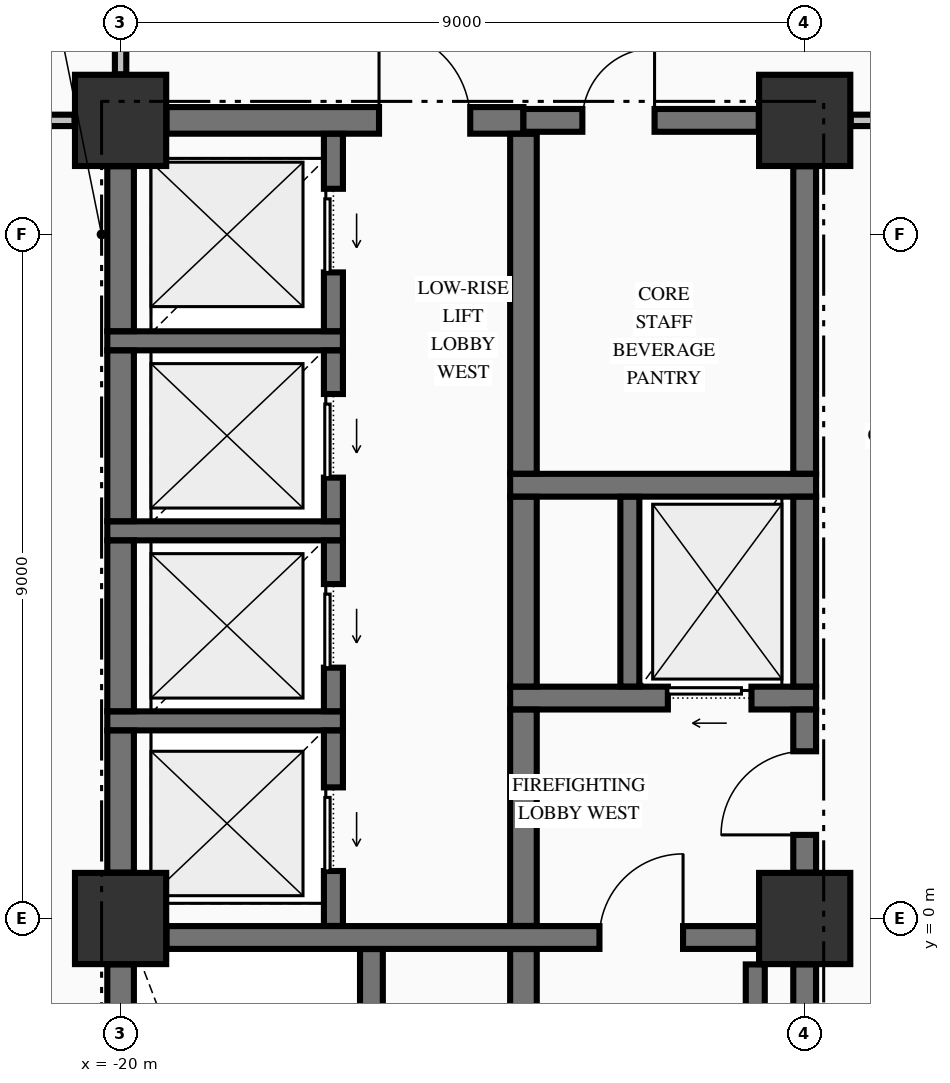
"""IFC4 building model, lengths in metres.
Left out: names, types, materials, properties, quantities, classifications, styles, units other than length and angle.
Written with IfcOpenShell. Run it as: python <this file> out.ifc"""

import sys

from ifc_helpers import new_model, si_unit, direction, frame, frame_2d, origin, origin_2d, place, context, subcontext, project, spatial, rectangle, extrude, element, fill, save


model = new_model("IFC4")
c1 = context("Model", 3, precision=1e-05, world=origin(), true_north=direction((0.0, 1.0)))
c2 = subcontext(c1, "Body", "Model", "MODEL_VIEW")
j1 = project(units=[si_unit("LENGTHUNIT", "METRE"), si_unit("PLANEANGLEUNIT", "RADIAN")], contexts=[c1])
p1 = place(None, origin())
s1 = spatial("IfcSite", under=j1, at=p1, CompositionType="ELEMENT")
p2 = place(p1, origin())
s2 = spatial("IfcBuilding", under=s1, at=p2, CompositionType="ELEMENT")
p3 = place(p2, frame((0.0, 0.0, 60.76)))
s3 = spatial("IfcBuildingStorey", under=s2, at=p3, CompositionType="ELEMENT", Elevation=60.76)
for number, where, z_axis, x_axis in (
    (1, (-20.0, 10.5, -0.3), (0.0, 0.0, 1.0), (1.0, 0.0, 0.0)),
    (2, (-11.0, 0.0, -0.3), (0.0, 0.0, 1.0), (1.0, 0.0, 0.0)),
    (3, (-11.0, 10.5, -0.3), (0.0, 0.0, 1.0), (1.0, 0.0, 0.0)),
    (4, (-20.0, 0.0, -0.3), (0.0, 0.0, 1.0), (1.0, 0.0, 0.0)),
):
    element("IfcColumn", number, at=place(p3, frame(where, z_axis=z_axis, x_axis=x_axis)), inside=s3, PredefinedType="COLUMN", context=c2, shape_type="SweptSolid", body=[
        extrude(rectangle(XDim=1.2, YDim=1.2, at=origin_2d()), origin(), (0.0, 0.0, 1.0), 3.62),
    ])
p4 = place(p3, frame((-19.396, -0.25, 0.0), z_axis=(0.0, 0.0, 1.0), x_axis=(1.0, 0.0, 0.0)))
e5 = element("IfcWall", 5, at=p4, inside=s3, PredefinedType="SHEAR", context=c2, shape_type="SweptSolid", body=[
    extrude(rectangle(XDim=7.792, YDim=0.3, at=frame_2d((3.896, 0.0))), origin(), (0.0, 0.0, 1.0), 3.32),
])
p5 = place(p4, frame((5.696, 0.0, 0.0)))
e6 = element("IfcOpeningElement", 6, at=p5, cuts=e5, PredefinedType="OPENING", context=c2, shape_type="SweptSolid", body=[
    extrude(rectangle(XDim=1.1, YDim=2.15, at=frame_2d((0.55, 1.075))), frame((0.0, 0.16, 0.0), z_axis=(0.0, -1.0, 0.0), x_axis=(1.0, 0.0, 0.0)), (0.0, 0.0, 1.0), 0.32),
])
p6 = place(p3, frame((-20.175, 2.6, 0.0), z_axis=(0.0, 0.0, 1.0), x_axis=(1.0, 0.0, 0.0)))
e7 = element("IfcWall", 7, at=p6, inside=s3, PredefinedType="SOLIDWALL", context=c2, shape_type="SweptSolid", body=[
    extrude(rectangle(XDim=3.1, YDim=0.25, at=frame_2d((1.55, 0.0))), origin(), (0.0, 0.0, 1.0), 3.32),
])
p7 = place(p3, frame((-14.875, 2.9, 0.0), z_axis=(0.0, 0.0, 1.0), x_axis=(1.0, 0.0, 0.0)))
e8 = element("IfcWall", 8, at=p7, inside=s3, PredefinedType="SHEAR", context=c2, shape_type="SweptSolid", body=[
    extrude(rectangle(XDim=4.025, YDim=0.3, at=frame_2d((2.012, 0.0))), origin(), (0.0, 0.0, 1.0), 3.32),
])
p8 = place(p7, frame((2.075, 0.0, 0.0)))
e9 = element("IfcOpeningElement", 9, at=p8, cuts=e8, PredefinedType="OPENING", context=c2, shape_type="SweptSolid", body=[
    extrude(rectangle(XDim=1.1, YDim=2.2, at=frame_2d((0.55, 1.1))), frame((0.0, 0.16, 0.0), z_axis=(0.0, -1.0, 0.0), x_axis=(1.0, 0.0, 0.0)), (0.0, 0.0, 1.0), 0.32),
])
p9 = place(p3, frame((-20.175, 5.1, 0.0), z_axis=(0.0, 0.0, 1.0), x_axis=(1.0, 0.0, 0.0)))
e10 = element("IfcWall", 10, at=p9, inside=s3, PredefinedType="SOLIDWALL", context=c2, shape_type="SweptSolid", body=[
    extrude(rectangle(XDim=3.1, YDim=0.25, at=frame_2d((1.55, 0.0))), origin(), (0.0, 0.0, 1.0), 3.32),
])
p10 = place(p3, frame((-14.875, 5.7, 0.0), z_axis=(0.0, 0.0, 1.0), x_axis=(1.0, 0.0, 0.0)))
e11 = element("IfcWall", 11, at=p10, inside=s3, PredefinedType="SHEAR", context=c2, shape_type="SweptSolid", body=[
    extrude(rectangle(XDim=4.025, YDim=0.3, at=frame_2d((2.012, 0.0))), origin(), (0.0, 0.0, 1.0), 3.32),
])
p11 = place(p3, frame((-20.175, 7.6, 0.0), z_axis=(0.0, 0.0, 1.0), x_axis=(1.0, 0.0, 0.0)))
e12 = element("IfcWall", 12, at=p11, inside=s3, PredefinedType="SOLIDWALL", context=c2, shape_type="SweptSolid", body=[
    extrude(rectangle(XDim=3.1, YDim=0.25, at=frame_2d((1.55, 0.0))), origin(), (0.0, 0.0, 1.0), 3.32),
])
p12 = place(p3, frame((-19.396, 10.5, 0.0), z_axis=(0.0, 0.0, 1.0), x_axis=(1.0, 0.0, 0.0)))
e13 = element("IfcWall", 13, at=p12, inside=s3, PredefinedType="SHEAR", context=c2, shape_type="SweptSolid", body=[
    extrude(rectangle(XDim=4.696, YDim=0.35, at=frame_2d((2.348, 0.0))), origin(), (0.0, 0.0, 1.0), 3.32),
])
p13 = place(p12, frame((2.796, 0.0, 0.0)))
e14 = element("IfcOpeningElement", 14, at=p13, cuts=e13, PredefinedType="OPENING", context=c2, shape_type="SweptSolid", body=[
    extrude(rectangle(XDim=1.2, YDim=2.15, at=frame_2d((0.6, 1.075))), frame((0.0, 0.185, 0.0), z_axis=(0.0, -1.0, 0.0), x_axis=(1.0, 0.0, 0.0)), (0.0, 0.0, 1.0), 0.37),
])
p14 = place(p3, frame((-14.7, 10.5, 0.0), z_axis=(0.0, 0.0, 1.0), x_axis=(1.0, 0.0, 0.0)))
e15 = element("IfcWall", 15, at=p14, inside=s3, PredefinedType="SHEAR", context=c2, shape_type="SweptSolid", body=[
    extrude(rectangle(XDim=3.096, YDim=0.3, at=frame_2d((1.548, 0.0))), origin(), (0.0, 0.0, 1.0), 3.32),
])
p15 = place(p14, frame((0.775, 0.0, 0.0)))
e16 = element("IfcOpeningElement", 16, at=p15, cuts=e15, PredefinedType="OPENING", context=c2, shape_type="SweptSolid", body=[
    extrude(rectangle(XDim=0.95, YDim=2.15, at=frame_2d((0.475, 1.075))), frame((0.0, 0.16, 0.0), z_axis=(0.0, -1.0, 0.0), x_axis=(1.0, 0.0, 0.0)), (0.0, 0.0, 1.0), 0.32),
])
p16 = place(p3, frame((-28.835, 10.5, 0.0), z_axis=(0.0, 0.0, 1.0), x_axis=(1.0, 0.0, 0.0)))
e17 = element("IfcWall", 17, at=p16, inside=s3, PredefinedType="PARTITIONING", context=c2, shape_type="SweptSolid", body=[
    extrude(rectangle(XDim=8.229, YDim=0.15, at=frame_2d((4.115, 0.0))), origin(), (0.0, 0.0, 1.0), 3.32),
])
p17 = place(p16, frame((3.835, 0.0, 0.0)))
e18 = element("IfcOpeningElement", 18, at=p17, cuts=e17, PredefinedType="OPENING", context=c2, shape_type="SweptSolid", body=[
    extrude(rectangle(XDim=1.0, YDim=2.15, at=frame_2d((0.5, 1.075))), frame((0.0, 0.085, 0.0), z_axis=(0.0, -1.0, 0.0), x_axis=(1.0, 0.0, 0.0)), (0.0, 0.0, 1.0), 0.17),
])
p18 = place(p3, frame((-10.394, 10.5, 0.0), z_axis=(0.0, 0.0, 1.0), x_axis=(1.0, 0.0, 0.0)))
e19 = element("IfcWall", 19, at=p18, inside=s3, PredefinedType="PARTITIONING", context=c2, shape_type="SweptSolid", body=[
    extrude(rectangle(XDim=20.788, YDim=0.15, at=frame_2d((10.394, 0.0))), origin(), (0.0, 0.0, 1.0), 3.32),
])
p19 = place(p18, frame((0.319, 0.0, 0.0)))
e20 = element("IfcOpeningElement", 20, at=p19, cuts=e19, PredefinedType="OPENING", context=c2, shape_type="SweptSolid", body=[
    extrude(rectangle(XDim=1.05, YDim=2.15, at=frame_2d((0.525, 1.075))), frame((0.0, 0.085, 0.0), z_axis=(0.0, -1.0, 0.0), x_axis=(1.0, 0.0, 0.0)), (0.0, 0.0, 1.0), 0.17),
])
p20 = place(p18, frame((19.419, 0.0, 0.0)))
e21 = element("IfcOpeningElement", 21, at=p20, cuts=e19, PredefinedType="OPENING", context=c2, shape_type="SweptSolid", body=[
    extrude(rectangle(XDim=1.05, YDim=2.15, at=frame_2d((0.525, 1.075))), frame((0.0, 0.085, 0.0), z_axis=(0.0, -1.0, 0.0), x_axis=(1.0, 0.0, 0.0)), (0.0, 0.0, 1.0), 0.17),
])
p21 = place(p3, frame((-20.0, -9.346, 0.0), z_axis=(0.0, 0.0, 1.0), x_axis=(0.0, 1.0, 0.0)))
e22 = element("IfcWall", 22, at=p21, inside=s3, PredefinedType="SHEAR", context=c2, shape_type="SweptSolid", body=[
    extrude(rectangle(XDim=8.742, YDim=0.35, at=frame_2d((4.371, 0.0))), origin(), (0.0, 0.0, 1.0), 3.32),
])
p22 = place(p3, frame((-20.0, 0.604, 0.0), z_axis=(0.0, 0.0, 1.0), x_axis=(0.0, 1.0, 0.0)))
e23 = element("IfcWall", 23, at=p22, inside=s3, PredefinedType="SHEAR", context=c2, shape_type="SweptSolid", body=[
    extrude(rectangle(XDim=1.869, YDim=0.35, at=frame_2d((0.935, 0.0))), origin(), (0.0, 0.0, 1.0), 3.32),
])
for number, where, z_axis, x_axis in (
    (24, (-20.0, 2.727, 0.0), (0.0, 0.0, 1.0), (0.0, 1.0, 0.0)),
    (25, (-20.0, 5.227, 0.0), (0.0, 0.0, 1.0), (0.0, 1.0, 0.0)),
):
    element("IfcWall", number, at=place(p3, frame(where, z_axis=z_axis, x_axis=x_axis)), inside=s3, PredefinedType="SHEAR", context=c2, shape_type="SweptSolid", body=[
        extrude(rectangle(XDim=2.246, YDim=0.35, at=frame_2d((1.123, 0.0))), origin(), (0.0, 0.0, 1.0), 3.32),
    ])
p23 = place(p3, frame((-20.0, 7.727, 0.0), z_axis=(0.0, 0.0, 1.0), x_axis=(0.0, 1.0, 0.0)))
e26 = element("IfcWall", 26, at=p23, inside=s3, PredefinedType="SHEAR", context=c2, shape_type="SweptSolid", body=[
    extrude(rectangle(XDim=2.169, YDim=0.35, at=frame_2d((1.084, 0.0))), origin(), (0.0, 0.0, 1.0), 3.32),
])
p24 = place(p3, frame((-17.2, -0.098, 0.0), z_axis=(0.0, 0.0, 1.0), x_axis=(0.0, 1.0, 0.0)))
e27 = element("IfcWall", 27, at=p24, inside=s3, PredefinedType="SOLIDWALL", context=c2, shape_type="SweptSolid", body=[
    extrude(rectangle(XDim=2.571, YDim=0.25, at=frame_2d((1.285, 0.0))), origin(), (0.0, 0.0, 1.0), 3.32),
])
p25 = place(p24, frame((0.723, 0.0, 0.0)))
e28 = element("IfcOpeningElement", 28, at=p25, cuts=e27, PredefinedType="OPENING", context=c2, shape_type="SweptSolid", body=[
    extrude(rectangle(XDim=1.1, YDim=2.2, at=frame_2d((0.55, 1.1))), frame((0.0, 0.135, 0.0), z_axis=(0.0, -1.0, 0.0), x_axis=(1.0, 0.0, 0.0)), (0.0, 0.0, 1.0), 0.27),
])
p26 = place(p3, frame((-17.2, 2.727, 0.0), z_axis=(0.0, 0.0, 1.0), x_axis=(0.0, 1.0, 0.0)))
e29 = element("IfcWall", 29, at=p26, inside=s3, PredefinedType="SOLIDWALL", context=c2, shape_type="SweptSolid", body=[
    extrude(rectangle(XDim=2.246, YDim=0.25, at=frame_2d((1.123, 0.0))), origin(), (0.0, 0.0, 1.0), 3.32),
])
p27 = place(p26, frame((0.573, 0.0, 0.0)))
e30 = element("IfcOpeningElement", 30, at=p27, cuts=e29, PredefinedType="OPENING", context=c2, shape_type="SweptSolid", body=[
    extrude(rectangle(XDim=1.1, YDim=2.2, at=frame_2d((0.55, 1.1))), frame((0.0, 0.135, 0.0), z_axis=(0.0, -1.0, 0.0), x_axis=(1.0, 0.0, 0.0)), (0.0, 0.0, 1.0), 0.27),
])
p28 = place(p3, frame((-17.2, 5.227, 0.0), z_axis=(0.0, 0.0, 1.0), x_axis=(0.0, 1.0, 0.0)))
e31 = element("IfcWall", 31, at=p28, inside=s3, PredefinedType="SOLIDWALL", context=c2, shape_type="SweptSolid", body=[
    extrude(rectangle(XDim=2.246, YDim=0.25, at=frame_2d((1.123, 0.0))), origin(), (0.0, 0.0, 1.0), 3.32),
])
p29 = place(p28, frame((0.573, 0.0, 0.0)))
e32 = element("IfcOpeningElement", 32, at=p29, cuts=e31, PredefinedType="OPENING", context=c2, shape_type="SweptSolid", body=[
    extrude(rectangle(XDim=1.1, YDim=2.2, at=frame_2d((0.55, 1.1))), frame((0.0, 0.135, 0.0), z_axis=(0.0, -1.0, 0.0), x_axis=(1.0, 0.0, 0.0)), (0.0, 0.0, 1.0), 0.27),
])
p30 = place(p3, frame((-17.2, 7.727, 0.0), z_axis=(0.0, 0.0, 1.0), x_axis=(0.0, 1.0, 0.0)))
e33 = element("IfcWall", 33, at=p30, inside=s3, PredefinedType="SOLIDWALL", context=c2, shape_type="SweptSolid", body=[
    extrude(rectangle(XDim=2.596, YDim=0.25, at=frame_2d((1.298, 0.0))), origin(), (0.0, 0.0, 1.0), 3.32),
])
p31 = place(p30, frame((0.773, 0.0, 0.0)))
e34 = element("IfcOpeningElement", 34, at=p31, cuts=e33, PredefinedType="OPENING", context=c2, shape_type="SweptSolid", body=[
    extrude(rectangle(XDim=1.1, YDim=2.2, at=frame_2d((0.55, 1.1))), frame((0.0, 0.135, 0.0), z_axis=(0.0, -1.0, 0.0), x_axis=(1.0, 0.0, 0.0)), (0.0, 0.0, 1.0), 0.27),
])
p32 = place(p3, frame((-16.7, -9.773, 0.0), z_axis=(0.0, 0.0, 1.0), x_axis=(0.0, 1.0, 0.0)))
e35 = element("IfcWall", 35, at=p32, inside=s3, PredefinedType="SHEAR", context=c2, shape_type="SweptSolid", body=[
    extrude(rectangle(XDim=9.371, YDim=0.3, at=frame_2d((4.686, 0.0))), origin(), (0.0, 0.0, 1.0), 3.32),
])
p33 = place(p3, frame((-14.7, -9.773, 0.0), z_axis=(0.0, 0.0, 1.0), x_axis=(0.0, 1.0, 0.0)))
e36 = element("IfcWall", 36, at=p33, inside=s3, PredefinedType="SHEAR", context=c2, shape_type="SweptSolid", body=[
    extrude(rectangle(XDim=9.371, YDim=0.35, at=frame_2d((4.686, 0.0))), origin(), (0.0, 0.0, 1.0), 3.32),
])
p34 = place(p3, frame((-14.7, -0.098, 0.0), z_axis=(0.0, 0.0, 1.0), x_axis=(0.0, 1.0, 0.0)))
e37 = element("IfcWall", 37, at=p34, inside=s3, PredefinedType="SHEAR", context=c2, shape_type="SweptSolid", body=[
    extrude(rectangle(XDim=2.846, YDim=0.35, at=frame_2d((1.423, 0.0))), origin(), (0.0, 0.0, 1.0), 3.32),
])
p35 = place(p3, frame((-14.7, 3.052, 0.0), z_axis=(0.0, 0.0, 1.0), x_axis=(0.0, 1.0, 0.0)))
e38 = element("IfcWall", 38, at=p35, inside=s3, PredefinedType="SHEAR", context=c2, shape_type="SweptSolid", body=[
    extrude(rectangle(XDim=2.496, YDim=0.35, at=frame_2d((1.248, 0.0))), origin(), (0.0, 0.0, 1.0), 3.32),
])
p36 = place(p3, frame((-14.7, 5.852, 0.0), z_axis=(0.0, 0.0, 1.0), x_axis=(0.0, 1.0, 0.0)))
e39 = element("IfcWall", 39, at=p36, inside=s3, PredefinedType="SHEAR", context=c2, shape_type="SweptSolid", body=[
    extrude(rectangle(XDim=4.471, YDim=0.35, at=frame_2d((2.235, 0.0))), origin(), (0.0, 0.0, 1.0), 3.32),
])
p37 = place(p3, frame((-13.3, 3.052, 0.0), z_axis=(0.0, 0.0, 1.0), x_axis=(0.0, 1.0, 0.0)))
e40 = element("IfcWall", 40, at=p37, inside=s3, PredefinedType="SOLIDWALL", context=c2, shape_type="SweptSolid", body=[
    extrude(rectangle(XDim=2.496, YDim=0.25, at=frame_2d((1.248, 0.0))), origin(), (0.0, 0.0, 1.0), 3.32),
])
p38 = place(p3, frame((-11.65, -9.346, 0.0), z_axis=(0.0, 0.0, 1.0), x_axis=(0.0, 1.0, 0.0)))
e41 = element("IfcWall", 41, at=p38, inside=s3, PredefinedType="SOLIDWALL", context=c2, shape_type="SweptSolid", body=[
    extrude(rectangle(XDim=8.742, YDim=0.25, at=frame_2d((4.371, 0.0))), origin(), (0.0, 0.0, 1.0), 3.32),
])
p39 = place(p3, frame((-11.0, -9.346, 0.0), z_axis=(0.0, 0.0, 1.0), x_axis=(0.0, 1.0, 0.0)))
e42 = element("IfcWall", 42, at=p39, inside=s3, PredefinedType="SHEAR", context=c2, shape_type="SweptSolid", body=[
    extrude(rectangle(XDim=8.742, YDim=0.3, at=frame_2d((4.371, 0.0))), origin(), (0.0, 0.0, 1.0), 3.32),
])
p40 = place(p3, frame((-11.0, 0.604, 0.0), z_axis=(0.0, 0.0, 1.0), x_axis=(0.0, 1.0, 0.0)))
e43 = element("IfcWall", 43, at=p40, inside=s3, PredefinedType="SHEAR", context=c2, shape_type="SweptSolid", body=[
    extrude(rectangle(XDim=2.144, YDim=0.3, at=frame_2d((1.072, 0.0))), origin(), (0.0, 0.0, 1.0), 3.32),
])
p41 = place(p40, frame((0.496, 0.0, 0.0)))
e44 = element("IfcOpeningElement", 44, at=p41, cuts=e43, PredefinedType="OPENING", context=c2, shape_type="SweptSolid", body=[
    extrude(rectangle(XDim=1.1, YDim=2.15, at=frame_2d((0.55, 1.075))), frame((0.0, 0.16, 0.0), z_axis=(0.0, -1.0, 0.0), x_axis=(1.0, 0.0, 0.0)), (0.0, 0.0, 1.0), 0.32),
])
p42 = place(p3, frame((-11.0, 3.052, 0.0), z_axis=(0.0, 0.0, 1.0), x_axis=(0.0, 1.0, 0.0)))
e45 = element("IfcWall", 45, at=p42, inside=s3, PredefinedType="SHEAR", context=c2, shape_type="SweptSolid", body=[
    extrude(rectangle(XDim=2.496, YDim=0.3, at=frame_2d((1.248, 0.0))), origin(), (0.0, 0.0, 1.0), 3.32),
])
p43 = place(p3, frame((-11.0, 5.852, 0.0), z_axis=(0.0, 0.0, 1.0), x_axis=(0.0, 1.0, 0.0)))
e46 = element("IfcWall", 46, at=p43, inside=s3, PredefinedType="SHEAR", context=c2, shape_type="SweptSolid", body=[
    extrude(rectangle(XDim=4.044, YDim=0.3, at=frame_2d((2.022, 0.0))), origin(), (0.0, 0.0, 1.0), 3.32),
])
p44 = place(p3, frame((-20.0, 11.106, 0.0), z_axis=(0.0, 0.0, 1.0), x_axis=(0.0, 1.0, 0.0)))
e47 = element("IfcWall", 47, at=p44, inside=s3, PredefinedType="PARTITIONING", context=c2, shape_type="SweptSolid", body=[
    extrude(rectangle(XDim=2.366, YDim=0.15, at=frame_2d((1.183, 0.0))), origin(), (0.0, 0.0, 1.0), 2.66),
])
p45 = place(p44, frame((0.449, 0.0, 0.0)))
e48 = element("IfcOpeningElement", 48, at=p45, cuts=e47, PredefinedType="OPENING", context=c2, shape_type="SweptSolid", body=[
    extrude(rectangle(XDim=0.95, YDim=2.15, at=frame_2d((0.475, 1.075))), frame((0.0, 0.085, 0.0), z_axis=(0.0, -1.0, 0.0), x_axis=(1.0, 0.0, 0.0)), (0.0, 0.0, 1.0), 0.17),
])
p46 = place(p5, origin())
e49 = element("IfcDoor", 49, at=p46, inside=s3, OperationType="SINGLE_SWING_RIGHT", PredefinedType="DOOR", context=c2, shape_type="SweptSolid", body=[
    extrude(rectangle(XDim=1.1, YDim=2.15, at=frame_2d((0.55, 1.075))), frame((0.0, 0.025, 0.0), z_axis=(0.0, -1.0, 0.0), x_axis=(1.0, 0.0, 0.0)), (0.0, 0.0, 1.0), 0.05),
])
fill(e6, e49)
p47 = place(p41, origin())
e50 = element("IfcDoor", 50, at=p47, inside=s3, OperationType="SINGLE_SWING_LEFT", PredefinedType="DOOR", context=c2, shape_type="SweptSolid", body=[
    extrude(rectangle(XDim=1.1, YDim=2.15, at=frame_2d((0.55, 1.075))), frame((0.0, 0.025, 0.0), z_axis=(0.0, -1.0, 0.0), x_axis=(1.0, 0.0, 0.0)), (0.0, 0.0, 1.0), 0.05),
])
fill(e44, e50)
p48 = place(p8, origin())
e51 = element("IfcDoor", 51, at=p48, inside=s3, OperationType="SLIDING_TO_LEFT", PredefinedType="DOOR", context=c2, shape_type="SweptSolid", body=[
    extrude(rectangle(XDim=1.1, YDim=2.2, at=frame_2d((0.55, 1.1))), frame((0.0, 0.025, 0.0), z_axis=(0.0, -1.0, 0.0), x_axis=(1.0, 0.0, 0.0)), (0.0, 0.0, 1.0), 0.05),
])
fill(e9, e51)
p49 = place(p15, origin())
e52 = element("IfcDoor", 52, at=p49, inside=s3, OperationType="SINGLE_SWING_RIGHT", PredefinedType="DOOR", context=c2, shape_type="SweptSolid", body=[
    extrude(rectangle(XDim=0.95, YDim=2.15, at=frame_2d((0.475, 1.075))), frame((0.0, 0.025, 0.0), z_axis=(0.0, -1.0, 0.0), x_axis=(1.0, 0.0, 0.0)), (0.0, 0.0, 1.0), 0.05),
])
fill(e16, e52)
p50 = place(p13, origin())
e53 = element("IfcDoor", 53, at=p50, inside=s3, OperationType="SINGLE_SWING_LEFT", PredefinedType="DOOR", context=c2, shape_type="SweptSolid", body=[
    extrude(rectangle(XDim=1.2, YDim=2.15, at=frame_2d((0.6, 1.075))), frame((0.0, 0.025, 0.0), z_axis=(0.0, -1.0, 0.0), x_axis=(1.0, 0.0, 0.0)), (0.0, 0.0, 1.0), 0.05),
])
fill(e14, e53)
p51 = place(p25, origin())
e54 = element("IfcDoor", 54, at=p51, inside=s3, OperationType="SLIDING_TO_LEFT", PredefinedType="DOOR", context=c2, shape_type="SweptSolid", body=[
    extrude(rectangle(XDim=1.1, YDim=2.2, at=frame_2d((0.55, 1.1))), frame((0.0, 0.025, 0.0), z_axis=(0.0, -1.0, 0.0), x_axis=(1.0, 0.0, 0.0)), (0.0, 0.0, 1.0), 0.05),
])
fill(e28, e54)
p52 = place(p27, origin())
e55 = element("IfcDoor", 55, at=p52, inside=s3, OperationType="SLIDING_TO_LEFT", PredefinedType="DOOR", context=c2, shape_type="SweptSolid", body=[
    extrude(rectangle(XDim=1.1, YDim=2.2, at=frame_2d((0.55, 1.1))), frame((0.0, 0.025, 0.0), z_axis=(0.0, -1.0, 0.0), x_axis=(1.0, 0.0, 0.0)), (0.0, 0.0, 1.0), 0.05),
])
fill(e30, e55)
p53 = place(p29, origin())
e56 = element("IfcDoor", 56, at=p53, inside=s3, OperationType="SLIDING_TO_LEFT", PredefinedType="DOOR", context=c2, shape_type="SweptSolid", body=[
    extrude(rectangle(XDim=1.1, YDim=2.2, at=frame_2d((0.55, 1.1))), frame((0.0, 0.025, 0.0), z_axis=(0.0, -1.0, 0.0), x_axis=(1.0, 0.0, 0.0)), (0.0, 0.0, 1.0), 0.05),
])
fill(e32, e56)
p54 = place(p31, origin())
e57 = element("IfcDoor", 57, at=p54, inside=s3, OperationType="SLIDING_TO_LEFT", PredefinedType="DOOR", context=c2, shape_type="SweptSolid", body=[
    extrude(rectangle(XDim=1.1, YDim=2.2, at=frame_2d((0.55, 1.1))), frame((0.0, 0.025, 0.0), z_axis=(0.0, -1.0, 0.0), x_axis=(1.0, 0.0, 0.0)), (0.0, 0.0, 1.0), 0.05),
])
fill(e34, e57)
save(model, sys.argv[1])
